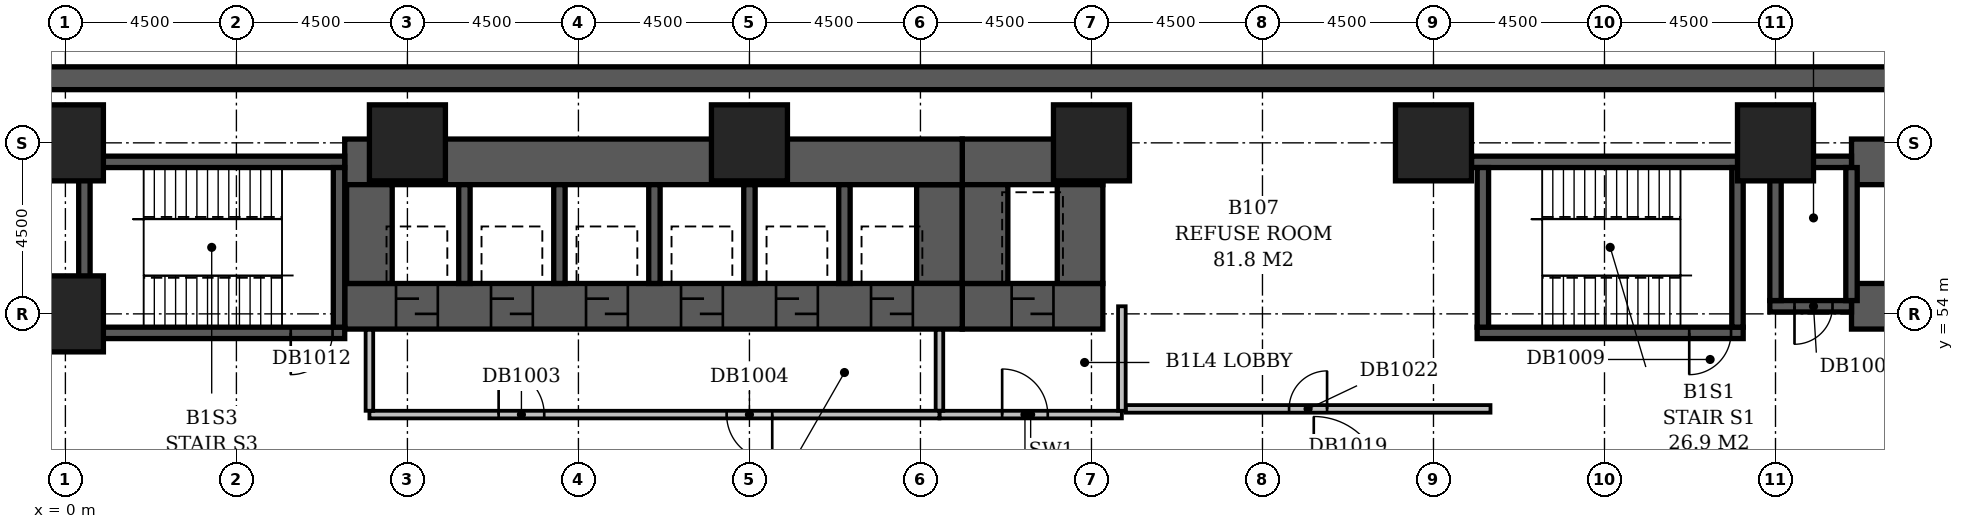
"""IFC4 building model, lengths in metres.
Left out: names, types, materials, properties, quantities, classifications, styles, units other than length and angle.
Written with IfcOpenShell. Run it as: python <this file> out.ifc"""

import sys

from ifc_helpers import new_model, si_unit, direction, frame, frame_2d, origin, origin_2d, place, context, subcontext, project, spatial, rectangle, extrude, element, fill, save


model = new_model("IFC4")
c1 = context("Model", 3, precision=1e-05, world=origin(), true_north=direction((0.0, 1.0)))
c2 = subcontext(c1, "Body", "Model", "MODEL_VIEW")
j1 = project(units=[si_unit("LENGTHUNIT", "METRE"), si_unit("PLANEANGLEUNIT", "RADIAN")], contexts=[c1])
p1 = place(None, origin())
s1 = spatial("IfcSite", under=j1, at=p1, CompositionType="ELEMENT")
p2 = place(p1, origin())
s2 = spatial("IfcBuilding", under=s1, at=p2, CompositionType="ELEMENT")
p3 = place(p2, frame((0.0, 0.0, -4.5)))
s3 = spatial("IfcBuildingStorey", under=s2, at=p3, CompositionType="ELEMENT", Elevation=-4.5)
for number, where, z_axis, x_axis in (
    (1, (0.0, 54.0, -0.4), (0.0, 0.0, 1.0), (1.0, 0.0, 0.0)),
    (2, (0.0, 58.5, -0.4), (0.0, 0.0, 1.0), (1.0, 0.0, 0.0)),
    (3, (9.0, 58.5, -0.4), (0.0, 0.0, 1.0), (1.0, 0.0, 0.0)),
    (4, (18.0, 58.5, -0.4), (0.0, 0.0, 1.0), (1.0, 0.0, 0.0)),
    (5, (27.0, 58.5, -0.4), (0.0, 0.0, 1.0), (1.0, 0.0, 0.0)),
    (6, (36.0, 58.5, -0.4), (0.0, 0.0, 1.0), (1.0, 0.0, 0.0)),
    (7, (45.0, 58.5, -0.4), (0.0, 0.0, 1.0), (1.0, 0.0, 0.0)),
):
    element("IfcColumn", number, at=place(p3, frame(where, z_axis=z_axis, x_axis=x_axis)), inside=s3, PredefinedType="COLUMN", context=c2, shape_type="SweptSolid", body=[
        extrude(rectangle(XDim=2.0, YDim=2.0, at=origin_2d()), origin(), (0.0, 0.0, 1.0), 4.45),
    ])
p4 = place(p3, frame((-2.0, 60.2, -0.4), z_axis=(0.0, 0.0, 1.0), x_axis=(1.0, 0.0, 0.0)))
e8 = element("IfcWall", 8, at=p4, inside=s3, PredefinedType="SOLIDWALL", context=c2, shape_type="SweptSolid", body=[
    extrude(rectangle(XDim=71.5, YDim=0.6, at=frame_2d((35.75, 0.0))), origin(), (0.0, 0.0, 1.0), 4.45),
])
p5 = place(p3, frame((0.35, 53.5, -0.4), z_axis=(0.0, 0.0, 1.0), x_axis=(1.0, 0.0, 0.0)))
e9 = element("IfcWall", 9, at=p5, inside=s3, PredefinedType="SHEAR", context=c2, shape_type="SweptSolid", body=[
    extrude(rectangle(XDim=7.0, YDim=0.3, at=frame_2d((3.5, 0.0))), origin(), (0.0, 0.0, 1.0), 4.45),
])
p6 = place(p5, frame((5.58, 0.0, 0.4)))
e10 = element("IfcOpeningElement", 10, at=p6, cuts=e9, PredefinedType="OPENING", context=c2, shape_type="SweptSolid", body=[
    extrude(rectangle(XDim=1.1, YDim=2.1, at=frame_2d((0.55, 1.05))), frame((0.0, 0.162, 0.0), z_axis=(0.0, -1.0, 0.0), x_axis=(1.0, 0.0, 0.0)), (0.0, 0.0, 1.0), 0.324),
])
p7 = place(p3, frame((37.15, 53.5, -0.4), z_axis=(0.0, 0.0, 1.0), x_axis=(1.0, 0.0, 0.0)))
e11 = element("IfcWall", 11, at=p7, inside=s3, PredefinedType="SHEAR", context=c2, shape_type="SweptSolid", body=[
    extrude(rectangle(XDim=7.0, YDim=0.3, at=frame_2d((3.5, 0.0))), origin(), (0.0, 0.0, 1.0), 4.45),
])
p8 = place(p7, frame((5.58, 0.0, 0.4)))
e12 = element("IfcOpeningElement", 12, at=p8, cuts=e11, PredefinedType="OPENING", context=c2, shape_type="SweptSolid", body=[
    extrude(rectangle(XDim=1.1, YDim=2.1, at=frame_2d((0.55, 1.05))), frame((0.0, 0.162, 0.0), z_axis=(0.0, -1.0, 0.0), x_axis=(1.0, 0.0, 0.0)), (0.0, 0.0, 1.0), 0.324),
])
p9 = place(p3, frame((7.35, 54.2, -0.4), z_axis=(0.0, 0.0, 1.0), x_axis=(1.0, 0.0, 0.0)))
e13 = element("IfcWall", 13, at=p9, inside=s3, PredefinedType="SHEAR", context=c2, shape_type="SweptSolid", body=[
    extrude(rectangle(XDim=16.25, YDim=1.2, at=frame_2d((8.125, 0.0))), origin(), (0.0, 0.0, 1.0), 4.45),
])
p10 = place(p9, frame((1.35, 0.0, 0.4)))
e14 = element("IfcOpeningElement", 14, at=p10, cuts=e13, PredefinedType="OPENING", context=c2, shape_type="SweptSolid", body=[
    extrude(rectangle(XDim=1.1, YDim=2.1, at=frame_2d((0.55, 1.05))), frame((0.0, 0.612, 0.0), z_axis=(0.0, -1.0, 0.0), x_axis=(1.0, 0.0, 0.0)), (0.0, 0.0, 1.0), 1.224),
])
p11 = place(p9, frame((3.85, 0.0, 0.4)))
e15 = element("IfcOpeningElement", 15, at=p11, cuts=e13, PredefinedType="OPENING", context=c2, shape_type="SweptSolid", body=[
    extrude(rectangle(XDim=1.1, YDim=2.1, at=frame_2d((0.55, 1.05))), frame((0.0, 0.612, 0.0), z_axis=(0.0, -1.0, 0.0), x_axis=(1.0, 0.0, 0.0)), (0.0, 0.0, 1.0), 1.224),
])
p12 = place(p9, frame((6.35, 0.0, 0.4)))
e16 = element("IfcOpeningElement", 16, at=p12, cuts=e13, PredefinedType="OPENING", context=c2, shape_type="SweptSolid", body=[
    extrude(rectangle(XDim=1.1, YDim=2.1, at=frame_2d((0.55, 1.05))), frame((0.0, 0.612, 0.0), z_axis=(0.0, -1.0, 0.0), x_axis=(1.0, 0.0, 0.0)), (0.0, 0.0, 1.0), 1.224),
])
p13 = place(p9, frame((8.85, 0.0, 0.4)))
e17 = element("IfcOpeningElement", 17, at=p13, cuts=e13, PredefinedType="OPENING", context=c2, shape_type="SweptSolid", body=[
    extrude(rectangle(XDim=1.1, YDim=2.1, at=frame_2d((0.55, 1.05))), frame((0.0, 0.612, 0.0), z_axis=(0.0, -1.0, 0.0), x_axis=(1.0, 0.0, 0.0)), (0.0, 0.0, 1.0), 1.224),
])
p14 = place(p9, frame((11.35, 0.0, 0.4)))
e18 = element("IfcOpeningElement", 18, at=p14, cuts=e13, PredefinedType="OPENING", context=c2, shape_type="SweptSolid", body=[
    extrude(rectangle(XDim=1.1, YDim=2.1, at=frame_2d((0.55, 1.05))), frame((0.0, 0.612, 0.0), z_axis=(0.0, -1.0, 0.0), x_axis=(1.0, 0.0, 0.0)), (0.0, 0.0, 1.0), 1.224),
])
p15 = place(p9, frame((13.85, 0.0, 0.4)))
e19 = element("IfcOpeningElement", 19, at=p15, cuts=e13, PredefinedType="OPENING", context=c2, shape_type="SweptSolid", body=[
    extrude(rectangle(XDim=1.1, YDim=2.1, at=frame_2d((0.55, 1.05))), frame((0.0, 0.612, 0.0), z_axis=(0.0, -1.0, 0.0), x_axis=(1.0, 0.0, 0.0)), (0.0, 0.0, 1.0), 1.224),
])
p16 = place(p3, frame((23.6, 54.2, -0.4), z_axis=(0.0, 0.0, 1.0), x_axis=(1.0, 0.0, 0.0)))
e20 = element("IfcWall", 20, at=p16, inside=s3, PredefinedType="SHEAR", context=c2, shape_type="SweptSolid", body=[
    extrude(rectangle(XDim=3.7, YDim=1.2, at=frame_2d((1.85, 0.0))), origin(), (0.0, 0.0, 1.0), 4.45),
])
p17 = place(p16, frame((1.3, 0.0, 0.4)))
e21 = element("IfcOpeningElement", 21, at=p17, cuts=e20, PredefinedType="OPENING", context=c2, shape_type="SweptSolid", body=[
    extrude(rectangle(XDim=1.1, YDim=2.1, at=frame_2d((0.55, 1.05))), frame((0.0, 0.612, 0.0), z_axis=(0.0, -1.0, 0.0), x_axis=(1.0, 0.0, 0.0)), (0.0, 0.0, 1.0), 1.224),
])
p18 = place(p3, frame((44.85, 54.2, -0.4), z_axis=(0.0, 0.0, 1.0), x_axis=(1.0, 0.0, 0.0)))
e22 = element("IfcWall", 22, at=p18, inside=s3, PredefinedType="SHEAR", context=c2, shape_type="SweptSolid", body=[
    extrude(rectangle(XDim=2.15, YDim=0.3, at=frame_2d((1.075, 0.0))), origin(), (0.0, 0.0, 1.0), 4.45),
])
p19 = place(p18, frame((0.65, 0.0, 0.4)))
e23 = element("IfcOpeningElement", 23, at=p19, cuts=e22, PredefinedType="OPENING", context=c2, shape_type="SweptSolid", body=[
    extrude(rectangle(XDim=1.0, YDim=2.1, at=frame_2d((0.5, 1.05))), frame((0.0, 0.162, 0.0), z_axis=(0.0, -1.0, 0.0), x_axis=(1.0, 0.0, 0.0)), (0.0, 0.0, 1.0), 0.324),
])
p20 = place(p3, frame((47.0, 54.2, -0.4), z_axis=(0.0, 0.0, 1.0), x_axis=(1.0, 0.0, 0.0)))
e24 = element("IfcWall", 24, at=p20, inside=s3, PredefinedType="SHEAR", context=c2, shape_type="SweptSolid", body=[
    extrude(rectangle(XDim=5.6, YDim=1.2, at=frame_2d((2.8, 0.0))), origin(), (0.0, 0.0, 1.0), 4.45),
])
p21 = place(p3, frame((0.35, 58.0, -0.4), z_axis=(0.0, 0.0, 1.0), x_axis=(1.0, 0.0, 0.0)))
e25 = element("IfcWall", 25, at=p21, inside=s3, PredefinedType="SHEAR", context=c2, shape_type="SweptSolid", body=[
    extrude(rectangle(XDim=7.0, YDim=0.3, at=frame_2d((3.5, 0.0))), origin(), (0.0, 0.0, 1.0), 4.45),
])
p22 = place(p3, frame((7.35, 58.0, -0.4), z_axis=(0.0, 0.0, 1.0), x_axis=(1.0, 0.0, 0.0)))
e26 = element("IfcWall", 26, at=p22, inside=s3, PredefinedType="SHEAR", context=c2, shape_type="SweptSolid", body=[
    extrude(rectangle(XDim=16.25, YDim=1.2, at=frame_2d((8.125, 0.0))), origin(), (0.0, 0.0, 1.0), 4.45),
])
p23 = place(p3, frame((23.6, 58.0, -0.4), z_axis=(0.0, 0.0, 1.0), x_axis=(1.0, 0.0, 0.0)))
e27 = element("IfcWall", 27, at=p23, inside=s3, PredefinedType="SHEAR", context=c2, shape_type="SweptSolid", body=[
    extrude(rectangle(XDim=3.7, YDim=1.2, at=frame_2d((1.85, 0.0))), origin(), (0.0, 0.0, 1.0), 4.45),
])
p24 = place(p3, frame((37.0, 58.0, -0.4), z_axis=(0.0, 0.0, 1.0), x_axis=(1.0, 0.0, 0.0)))
e28 = element("IfcWall", 28, at=p24, inside=s3, PredefinedType="SHEAR", context=c2, shape_type="SweptSolid", body=[
    extrude(rectangle(XDim=7.15, YDim=0.3, at=frame_2d((3.575, 0.0))), origin(), (0.0, 0.0, 1.0), 4.45),
])
p25 = place(p3, frame((44.85, 58.0, -0.4), z_axis=(0.0, 0.0, 1.0), x_axis=(1.0, 0.0, 0.0)))
e29 = element("IfcWall", 29, at=p25, inside=s3, PredefinedType="SHEAR", context=c2, shape_type="SweptSolid", body=[
    extrude(rectangle(XDim=2.15, YDim=0.3, at=frame_2d((1.075, 0.0))), origin(), (0.0, 0.0, 1.0), 4.45),
])
p26 = place(p3, frame((47.0, 58.0, -0.4), z_axis=(0.0, 0.0, 1.0), x_axis=(1.0, 0.0, 0.0)))
e30 = element("IfcWall", 30, at=p26, inside=s3, PredefinedType="SHEAR", context=c2, shape_type="SweptSolid", body=[
    extrude(rectangle(XDim=6.0, YDim=1.2, at=frame_2d((3.0, 0.0))), origin(), (0.0, 0.0, 1.0), 4.45),
])
for number, where, z_axis, x_axis in (
    (31, (0.5, 53.65, -0.4), (0.0, 0.0, 1.0), (0.0, 1.0, 0.0)),
    (32, (7.2, 53.65, -0.4), (0.0, 0.0, 1.0), (0.0, 1.0, 0.0)),
):
    element("IfcWall", number, at=place(p3, frame(where, z_axis=z_axis, x_axis=x_axis)), inside=s3, PredefinedType="SHEAR", context=c2, shape_type="SweptSolid", body=[
        extrude(rectangle(XDim=4.2, YDim=0.3, at=frame_2d((2.1, 0.0))), origin(), (0.0, 0.0, 1.0), 4.45),
    ])
p27 = place(p3, frame((8.0, 54.8, -0.4), z_axis=(0.0, 0.0, 1.0), x_axis=(0.0, 1.0, 0.0)))
e33 = element("IfcWall", 33, at=p27, inside=s3, PredefinedType="SHEAR", context=c2, shape_type="SweptSolid", body=[
    extrude(rectangle(XDim=2.6, YDim=1.2, at=frame_2d((1.3, 0.0))), origin(), (0.0, 0.0, 1.0), 4.45),
])
for number, where, z_axis, x_axis in (
    (34, (10.5, 54.8, -0.4), (0.0, 0.0, 1.0), (0.0, 1.0, 0.0)),
    (35, (13.0, 54.8, -0.4), (0.0, 0.0, 1.0), (0.0, 1.0, 0.0)),
    (36, (15.5, 54.8, -0.4), (0.0, 0.0, 1.0), (0.0, 1.0, 0.0)),
    (37, (18.0, 54.8, -0.4), (0.0, 0.0, 1.0), (0.0, 1.0, 0.0)),
    (38, (20.5, 54.8, -0.4), (0.0, 0.0, 1.0), (0.0, 1.0, 0.0)),
):
    element("IfcWall", number, at=place(p3, frame(where, z_axis=z_axis, x_axis=x_axis)), inside=s3, PredefinedType="SHEAR", context=c2, shape_type="SweptSolid", body=[
        extrude(rectangle(XDim=2.6, YDim=0.3, at=frame_2d((1.3, 0.0))), origin(), (0.0, 0.0, 1.0), 4.45),
    ])
for number, where, z_axis, x_axis in (
    (39, (23.0, 54.8, -0.4), (0.0, 0.0, 1.0), (0.0, 1.0, 0.0)),
    (40, (24.2, 54.8, -0.4), (0.0, 0.0, 1.0), (0.0, 1.0, 0.0)),
    (41, (26.7, 54.8, -0.4), (0.0, 0.0, 1.0), (0.0, 1.0, 0.0)),
):
    element("IfcWall", number, at=place(p3, frame(where, z_axis=z_axis, x_axis=x_axis)), inside=s3, PredefinedType="SHEAR", context=c2, shape_type="SweptSolid", body=[
        extrude(rectangle(XDim=2.6, YDim=1.2, at=frame_2d((1.3, 0.0))), origin(), (0.0, 0.0, 1.0), 4.45),
    ])
for number, where, z_axis, x_axis in (
    (42, (37.3, 53.65, -0.4), (0.0, 0.0, 1.0), (0.0, 1.0, 0.0)),
    (43, (44.0, 53.65, -0.4), (0.0, 0.0, 1.0), (0.0, 1.0, 0.0)),
):
    element("IfcWall", number, at=place(p3, frame(where, z_axis=z_axis, x_axis=x_axis)), inside=s3, PredefinedType="SHEAR", context=c2, shape_type="SweptSolid", body=[
        extrude(rectangle(XDim=4.2, YDim=0.3, at=frame_2d((2.1, 0.0))), origin(), (0.0, 0.0, 1.0), 4.45),
    ])
for number, where, z_axis, x_axis in (
    (44, (45.0, 54.35, -0.4), (0.0, 0.0, 1.0), (0.0, 1.0, 0.0)),
    (45, (47.0, 54.35, -0.4), (0.0, 0.0, 1.0), (0.0, 1.0, 0.0)),
):
    element("IfcWall", number, at=place(p3, frame(where, z_axis=z_axis, x_axis=x_axis)), inside=s3, PredefinedType="SHEAR", context=c2, shape_type="SweptSolid", body=[
        extrude(rectangle(XDim=3.5, YDim=0.3, at=frame_2d((1.75, 0.0))), origin(), (0.0, 0.0, 1.0), 4.45),
    ])
p28 = place(p3, frame((8.0, 51.35, 0.0), z_axis=(0.0, 0.0, 1.0), x_axis=(1.0, 0.0, 0.0)))
e46 = element("IfcWall", 46, at=p28, inside=s3, PredefinedType="PARTITIONING", context=c2, shape_type="SweptSolid", body=[
    extrude(rectangle(XDim=15.0, YDim=0.2, at=frame_2d((7.5, 0.0))), origin(), (0.0, 0.0, 1.0), 4.05),
])
p29 = place(p28, frame((3.4, 0.0, 0.0)))
e47 = element("IfcOpeningElement", 47, at=p29, cuts=e46, PredefinedType="OPENING", context=c2, shape_type="SweptSolid", body=[
    extrude(rectangle(XDim=1.2, YDim=2.1, at=frame_2d((0.6, 1.05))), frame((0.0, 0.112, 0.0), z_axis=(0.0, -1.0, 0.0), x_axis=(1.0, 0.0, 0.0)), (0.0, 0.0, 1.0), 0.224),
])
p30 = place(p28, frame((9.4, 0.0, 0.0)))
e48 = element("IfcOpeningElement", 48, at=p30, cuts=e46, PredefinedType="OPENING", context=c2, shape_type="SweptSolid", body=[
    extrude(rectangle(XDim=1.2, YDim=2.1, at=frame_2d((0.6, 1.05))), frame((0.0, 0.112, 0.0), z_axis=(0.0, -1.0, 0.0), x_axis=(1.0, 0.0, 0.0)), (0.0, 0.0, 1.0), 0.224),
])
for number, where, z_axis, x_axis in (
    (49, (23.0, 51.45, 0.0), (0.0, 0.0, 1.0), (0.0, 1.0, 0.0)),
    (50, (8.0, 51.45, 0.0), (0.0, 0.0, 1.0), (0.0, 1.0, 0.0)),
):
    element("IfcWall", number, at=place(p3, frame(where, z_axis=z_axis, x_axis=x_axis)), inside=s3, PredefinedType="PARTITIONING", context=c2, shape_type="SweptSolid", body=[
        extrude(rectangle(XDim=2.13, YDim=0.2, at=frame_2d((1.065, 0.0))), origin(), (0.0, 0.0, 1.0), 4.05),
    ])
p31 = place(p3, frame((23.0, 51.35, 0.0), z_axis=(0.0, 0.0, 1.0), x_axis=(1.0, 0.0, 0.0)))
e51 = element("IfcWall", 51, at=p31, inside=s3, PredefinedType="PARTITIONING", context=c2, shape_type="SweptSolid", body=[
    extrude(rectangle(XDim=4.8, YDim=0.2, at=frame_2d((2.4, 0.0))), origin(), (0.0, 0.0, 1.0), 4.05),
])
p32 = place(p31, frame((1.65, 0.0, 0.0)))
e52 = element("IfcOpeningElement", 52, at=p32, cuts=e51, PredefinedType="OPENING", context=c2, shape_type="SweptSolid", body=[
    extrude(rectangle(XDim=1.2, YDim=2.1, at=frame_2d((0.6, 1.05))), frame((0.0, 0.112, 0.0), z_axis=(0.0, -1.0, 0.0), x_axis=(1.0, 0.0, 0.0)), (0.0, 0.0, 1.0), 0.224),
])
p33 = place(p3, frame((27.8, 51.45, 0.0), z_axis=(0.0, 0.0, 1.0), x_axis=(0.0, 1.0, 0.0)))
e53 = element("IfcWall", 53, at=p33, inside=s3, PredefinedType="PARTITIONING", context=c2, shape_type="SweptSolid", body=[
    extrude(rectangle(XDim=2.75, YDim=0.2, at=frame_2d((1.375, 0.0))), origin(), (0.0, 0.0, 1.0), 4.05),
])
p34 = place(p3, frame((37.5, 51.5, 0.0), z_axis=(0.0, 0.0, 1.0), x_axis=(-1.0, 0.0, 0.0)))
e54 = element("IfcWall", 54, at=p34, inside=s3, PredefinedType="PARTITIONING", context=c2, shape_type="SweptSolid", body=[
    extrude(rectangle(XDim=9.6, YDim=0.2, at=frame_2d((4.8, 0.0))), origin(), (0.0, 0.0, 1.0), 4.05),
])
p35 = place(p34, frame((4.3, 0.0, 0.0)))
e55 = element("IfcOpeningElement", 55, at=p35, cuts=e54, PredefinedType="OPENING", context=c2, shape_type="SweptSolid", body=[
    extrude(rectangle(XDim=1.0, YDim=2.1, at=frame_2d((0.5, 1.05))), frame((0.0, 0.112, 0.0), z_axis=(0.0, -1.0, 0.0), x_axis=(1.0, 0.0, 0.0)), (0.0, 0.0, 1.0), 0.224),
])
p36 = place(p32, origin())
e56 = element("IfcDoor", 56, at=p36, inside=s3, OperationType="SINGLE_SWING_LEFT", PredefinedType="DOOR", context=c2, shape_type="SweptSolid", body=[
    extrude(rectangle(XDim=1.2, YDim=2.1, at=frame_2d((0.6, 1.05))), frame((0.0, 0.025, 0.0), z_axis=(0.0, -1.0, 0.0), x_axis=(1.0, 0.0, 0.0)), (0.0, 0.0, 1.0), 0.05),
])
fill(e52, e56)
p37 = place(p17, origin())
e57 = element("IfcDoor", 57, at=p37, inside=s3, OperationType="SLIDING_TO_LEFT", PredefinedType="DOOR", context=c2, shape_type="SweptSolid", body=[
    extrude(rectangle(XDim=1.1, YDim=2.1, at=frame_2d((0.55, 1.05))), frame((0.0, 0.025, 0.0), z_axis=(0.0, -1.0, 0.0), x_axis=(1.0, 0.0, 0.0)), (0.0, 0.0, 1.0), 0.05),
])
fill(e21, e57)
p38 = place(p10, origin())
e58 = element("IfcDoor", 58, at=p38, inside=s3, OperationType="SLIDING_TO_LEFT", PredefinedType="DOOR", context=c2, shape_type="SweptSolid", body=[
    extrude(rectangle(XDim=1.1, YDim=2.1, at=frame_2d((0.55, 1.05))), frame((0.0, 0.025, 0.0), z_axis=(0.0, -1.0, 0.0), x_axis=(1.0, 0.0, 0.0)), (0.0, 0.0, 1.0), 0.05),
])
fill(e14, e58)
p39 = place(p11, origin())
e59 = element("IfcDoor", 59, at=p39, inside=s3, OperationType="SLIDING_TO_LEFT", PredefinedType="DOOR", context=c2, shape_type="SweptSolid", body=[
    extrude(rectangle(XDim=1.1, YDim=2.1, at=frame_2d((0.55, 1.05))), frame((0.0, 0.025, 0.0), z_axis=(0.0, -1.0, 0.0), x_axis=(1.0, 0.0, 0.0)), (0.0, 0.0, 1.0), 0.05),
])
fill(e15, e59)
p40 = place(p12, origin())
e60 = element("IfcDoor", 60, at=p40, inside=s3, OperationType="SLIDING_TO_LEFT", PredefinedType="DOOR", context=c2, shape_type="SweptSolid", body=[
    extrude(rectangle(XDim=1.1, YDim=2.1, at=frame_2d((0.55, 1.05))), frame((0.0, 0.025, 0.0), z_axis=(0.0, -1.0, 0.0), x_axis=(1.0, 0.0, 0.0)), (0.0, 0.0, 1.0), 0.05),
])
fill(e16, e60)
p41 = place(p13, origin())
e61 = element("IfcDoor", 61, at=p41, inside=s3, OperationType="SLIDING_TO_LEFT", PredefinedType="DOOR", context=c2, shape_type="SweptSolid", body=[
    extrude(rectangle(XDim=1.1, YDim=2.1, at=frame_2d((0.55, 1.05))), frame((0.0, 0.025, 0.0), z_axis=(0.0, -1.0, 0.0), x_axis=(1.0, 0.0, 0.0)), (0.0, 0.0, 1.0), 0.05),
])
fill(e17, e61)
p42 = place(p14, origin())
e62 = element("IfcDoor", 62, at=p42, inside=s3, OperationType="SLIDING_TO_LEFT", PredefinedType="DOOR", context=c2, shape_type="SweptSolid", body=[
    extrude(rectangle(XDim=1.1, YDim=2.1, at=frame_2d((0.55, 1.05))), frame((0.0, 0.025, 0.0), z_axis=(0.0, -1.0, 0.0), x_axis=(1.0, 0.0, 0.0)), (0.0, 0.0, 1.0), 0.05),
])
fill(e18, e62)
p43 = place(p15, origin())
e63 = element("IfcDoor", 63, at=p43, inside=s3, OperationType="SLIDING_TO_LEFT", PredefinedType="DOOR", context=c2, shape_type="SweptSolid", body=[
    extrude(rectangle(XDim=1.1, YDim=2.1, at=frame_2d((0.55, 1.05))), frame((0.0, 0.025, 0.0), z_axis=(0.0, -1.0, 0.0), x_axis=(1.0, 0.0, 0.0)), (0.0, 0.0, 1.0), 0.05),
])
fill(e19, e63)
p44 = place(p29, origin())
e64 = element("IfcDoor", 64, at=p44, inside=s3, OperationType="SINGLE_SWING_LEFT", PredefinedType="DOOR", context=c2, shape_type="SweptSolid", body=[
    extrude(rectangle(XDim=1.2, YDim=2.1, at=frame_2d((0.6, 1.05))), frame((0.0, 0.025, 0.0), z_axis=(0.0, -1.0, 0.0), x_axis=(1.0, 0.0, 0.0)), (0.0, 0.0, 1.0), 0.05),
])
fill(e47, e64)
p45 = place(p30, origin())
e65 = element("IfcDoor", 65, at=p45, inside=s3, OperationType="SINGLE_SWING_RIGHT", PredefinedType="DOOR", context=c2, shape_type="SweptSolid", body=[
    extrude(rectangle(XDim=1.2, YDim=2.1, at=frame_2d((0.6, 1.05))), frame((0.0, 0.025, 0.0), z_axis=(0.0, -1.0, 0.0), x_axis=(1.0, 0.0, 0.0)), (0.0, 0.0, 1.0), 0.05),
])
fill(e48, e65)
p46 = place(p19, frame((1.0, 0.0, 0.0), z_axis=(0.0, 0.0, 1.0), x_axis=(-1.0, 0.0, 0.0)))
e66 = element("IfcDoor", 66, at=p46, inside=s3, OperationType="SINGLE_SWING_RIGHT", PredefinedType="DOOR", context=c2, shape_type="SweptSolid", body=[
    extrude(rectangle(XDim=1.0, YDim=2.1, at=frame_2d((0.5, 1.05))), frame((0.0, 0.025, 0.0), z_axis=(0.0, -1.0, 0.0), x_axis=(1.0, 0.0, 0.0)), (0.0, 0.0, 1.0), 0.05),
])
fill(e23, e66)
p47 = place(p8, frame((1.1, 0.0, 0.0), z_axis=(0.0, 0.0, 1.0), x_axis=(-1.0, 0.0, 0.0)))
e67 = element("IfcDoor", 67, at=p47, inside=s3, OperationType="SINGLE_SWING_RIGHT", PredefinedType="DOOR", context=c2, shape_type="SweptSolid", body=[
    extrude(rectangle(XDim=1.1, YDim=2.1, at=frame_2d((0.55, 1.05))), frame((0.0, 0.025, 0.0), z_axis=(0.0, -1.0, 0.0), x_axis=(1.0, 0.0, 0.0)), (0.0, 0.0, 1.0), 0.05),
])
fill(e12, e67)
p48 = place(p6, frame((1.1, 0.0, 0.0), z_axis=(0.0, 0.0, 1.0), x_axis=(-1.0, 0.0, 0.0)))
e68 = element("IfcDoor", 68, at=p48, inside=s3, OperationType="SINGLE_SWING_RIGHT", PredefinedType="DOOR", context=c2, shape_type="SweptSolid", body=[
    extrude(rectangle(XDim=1.1, YDim=2.1, at=frame_2d((0.55, 1.05))), frame((0.0, 0.025, 0.0), z_axis=(0.0, -1.0, 0.0), x_axis=(1.0, 0.0, 0.0)), (0.0, 0.0, 1.0), 0.05),
])
fill(e10, e68)
p49 = place(p35, frame((1.0, 0.0, 0.0), z_axis=(0.0, 0.0, 1.0), x_axis=(-1.0, 0.0, 0.0)))
e69 = element("IfcDoor", 69, at=p49, inside=s3, OperationType="SINGLE_SWING_RIGHT", PredefinedType="DOOR", context=c2, shape_type="SweptSolid", body=[
    extrude(rectangle(XDim=1.0, YDim=2.1, at=frame_2d((0.5, 1.05))), frame((0.0, 0.025, 0.0), z_axis=(0.0, -1.0, 0.0), x_axis=(1.0, 0.0, 0.0)), (0.0, 0.0, 1.0), 0.05),
])
fill(e55, e69)
save(model, sys.argv[1])
